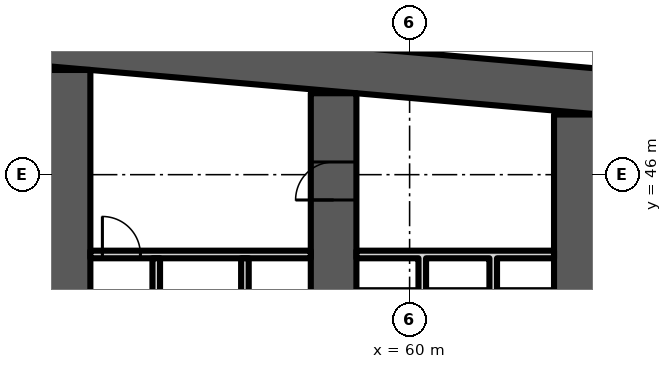
"""IFC4 building model, lengths in metres.
Left out: names, types, materials, properties, quantities, classifications, styles, units other than length and angle.
Written with IfcOpenShell. Run it as: python <this file> out.ifc"""

import sys

from ifc_helpers import new_model, si_unit, direction, frame, frame_2d, origin, place, context, subcontext, project, spatial, polyline, rectangle, outline, extrude, element, fill, save


model = new_model("IFC4")
c1 = context("Model", 3, precision=1e-05, world=origin(), true_north=direction((0.0, 1.0)))
c2 = subcontext(c1, "Body", "Model", "MODEL_VIEW")
j1 = project(units=[si_unit("LENGTHUNIT", "METRE"), si_unit("PLANEANGLEUNIT", "RADIAN")], contexts=[c1])
p1 = place(None, origin())
s1 = spatial("IfcSite", under=j1, at=p1, CompositionType="ELEMENT")
p2 = place(p1, origin())
s2 = spatial("IfcBuilding", under=s1, at=p2, CompositionType="ELEMENT")
p3 = place(p2, frame((0.0, 0.0, 55.9)))
s3 = spatial("IfcBuildingStorey", under=s2, at=p3, CompositionType="ELEMENT", Elevation=55.9)
p4 = place(p3, origin())
e1 = element("IfcWall", 1, at=p4, inside=s3, PredefinedType="SHEAR", context=c2, shape_type="SweptSolid", body=[
    extrude(outline(polyline([(9.0, 47.583), (37.0, 50.032), (65.0, 47.583), (65.0, 48.787), (37.0, 51.237), (9.0, 48.787), (9.0, 47.583)])), origin(), (0.0, 0.0, 1.0), 3.6),
])
p5 = place(p3, frame((51.0, 35.2, 0.0), z_axis=(0.0, 0.0, 1.0), x_axis=(0.0, 1.0, 0.0)))
e2 = element("IfcWall", 2, at=p5, inside=s3, PredefinedType="SHEAR", context=c2, shape_type="SweptSolid", body=[
    extrude(rectangle(XDim=13.555, YDim=1.2, at=frame_2d((6.778, 0.0))), origin(), (0.0, 0.0, 1.0), 3.6),
])
p6 = place(p5, frame((3.2, 0.0, 0.0)))
e3 = element("IfcOpeningElement", 3, at=p6, cuts=e2, PredefinedType="OPENING", context=c2, shape_type="SweptSolid", body=[
    extrude(rectangle(XDim=1.1, YDim=2.1, at=frame_2d((0.55, 1.05))), frame((0.0, 0.61, 0.0), z_axis=(0.0, -1.0, 0.0), x_axis=(1.0, 0.0, 0.0)), (0.0, 0.0, 1.0), 1.22),
])
p7 = place(p3, frame((58.0, 35.2, 0.0), z_axis=(0.0, 0.0, 1.0), x_axis=(0.0, 1.0, 0.0)))
e4 = element("IfcWall", 4, at=p7, inside=s3, PredefinedType="SHEAR", context=c2, shape_type="SweptSolid", body=[
    extrude(rectangle(XDim=12.943, YDim=1.2, at=frame_2d((6.471, 0.0))), origin(), (0.0, 0.0, 1.0), 3.6),
])
p8 = place(p7, frame((10.134, 0.0, 0.0)))
e5 = element("IfcOpeningElement", 5, at=p8, cuts=e4, PredefinedType="OPENING", context=c2, shape_type="SweptSolid", body=[
    extrude(rectangle(XDim=1.0, YDim=2.1, at=frame_2d((0.5, 1.05))), frame((0.0, 0.61, 0.0), z_axis=(0.0, -1.0, 0.0), x_axis=(1.0, 0.0, 0.0)), (0.0, 0.0, 1.0), 1.22),
])
p9 = place(p7, frame((3.2, 0.0, 0.0)))
e6 = element("IfcOpeningElement", 6, at=p9, cuts=e4, PredefinedType="OPENING", context=c2, shape_type="SweptSolid", body=[
    extrude(rectangle(XDim=1.1, YDim=2.1, at=frame_2d((0.55, 1.05))), frame((0.0, 0.61, 0.0), z_axis=(0.0, -1.0, 0.0), x_axis=(1.0, 0.0, 0.0)), (0.0, 0.0, 1.0), 1.22),
])
p10 = place(p3, frame((64.4, 35.2, 0.0), z_axis=(0.0, 0.0, 1.0), x_axis=(0.0, 1.0, 0.0)))
e7 = element("IfcWall", 7, at=p10, inside=s3, PredefinedType="SHEAR", context=c2, shape_type="SweptSolid", body=[
    extrude(rectangle(XDim=12.383, YDim=1.2, at=frame_2d((6.191, 0.0))), origin(), (0.0, 0.0, 1.0), 3.6),
])
p11 = place(p3, frame((51.6, 43.9, 0.0), z_axis=(0.0, 0.0, 1.0), x_axis=(1.0, 0.0, 0.0)))
e8 = element("IfcWall", 8, at=p11, inside=s3, PredefinedType="PARTITIONING", context=c2, shape_type="SweptSolid", body=[
    extrude(rectangle(XDim=5.8, YDim=0.2, at=frame_2d((2.9, 0.0))), origin(), (0.0, 0.0, 1.0), 3.2),
])
p12 = place(p11, frame((0.317, 0.0, 0.0)))
e9 = element("IfcOpeningElement", 9, at=p12, cuts=e8, PredefinedType="OPENING", context=c2, shape_type="SweptSolid", body=[
    extrude(rectangle(XDim=1.0, YDim=2.1, at=frame_2d((0.5, 1.05))), frame((0.0, 0.11, 0.0), z_axis=(0.0, -1.0, 0.0), x_axis=(1.0, 0.0, 0.0)), (0.0, 0.0, 1.0), 0.22),
])
p13 = place(p3, origin())
e10 = element("IfcWall", 10, at=p13, inside=s3, PredefinedType="PARTITIONING", context=c2, shape_type="SweptSolid", body=[
    extrude(outline(polyline([(53.233, 40.8), (53.233, 43.8), (53.433, 43.8), (53.433, 40.8), (53.233, 40.8)])), origin(), (0.0, 0.0, 1.0), 3.2),
])
p14 = place(p3, origin())
e11 = element("IfcWall", 11, at=p14, inside=s3, PredefinedType="PARTITIONING", context=c2, shape_type="SweptSolid", body=[
    extrude(outline(polyline([(55.567, 40.8), (55.567, 43.8), (55.767, 43.8), (55.767, 40.8), (55.567, 40.8)])), origin(), (0.0, 0.0, 1.0), 3.2),
])
p15 = place(p3, origin())
e12 = element("IfcWall", 12, at=p15, inside=s3, PredefinedType="PARTITIONING", context=c2, shape_type="SweptSolid", body=[
    extrude(outline(polyline([(60.433, 40.8), (60.233, 40.8), (60.233, 43.8), (58.6, 43.8), (58.6, 44.0), (63.8, 44.0), (63.8, 43.8), (62.3, 43.8), (62.3, 40.8), (62.1, 40.8), (62.1, 43.8), (60.433, 43.8), (60.433, 40.8)])), origin(), (0.0, 0.0, 1.0), 3.2),
])
p16 = place(p12, origin())
e13 = element("IfcDoor", 13, at=p16, inside=s3, OperationType="SINGLE_SWING_LEFT", PredefinedType="DOOR", context=c2, shape_type="SweptSolid", body=[
    extrude(rectangle(XDim=1.0, YDim=2.1, at=frame_2d((0.5, 1.05))), frame((0.0, 0.025, 0.0), z_axis=(0.0, -1.0, 0.0), x_axis=(1.0, 0.0, 0.0)), (0.0, 0.0, 1.0), 0.05),
])
fill(e9, e13)
p17 = place(p8, origin())
e14 = element("IfcDoor", 14, at=p17, inside=s3, OperationType="SINGLE_SWING_LEFT", PredefinedType="DOOR", context=c2, shape_type="SweptSolid", body=[
    extrude(rectangle(XDim=1.0, YDim=2.1, at=frame_2d((0.5, 1.05))), frame((0.0, 0.6, 0.0), z_axis=(0.0, -1.0, 0.0), x_axis=(1.0, 0.0, 0.0)), (0.0, 0.0, 1.0), 1.199),
])
fill(e5, e14)
save(model, sys.argv[1])
